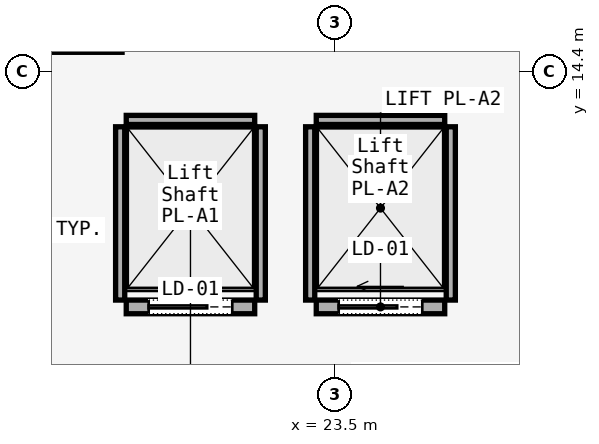
"""IFC4 building model, lengths in metres.
Left out: names, types, materials, properties, quantities, classifications, styles, units other than length and angle.
Written with IfcOpenShell. Run it as: python <this file> out.ifc"""

import sys

from ifc_helpers import new_model, si_unit, direction, frame, frame_2d, origin, place, context, subcontext, project, spatial, rectangle, extrude, element, fill, save


model = new_model("IFC4")
c1 = context("Model", 3, precision=1e-05, world=origin(), true_north=direction((0.0, 1.0)))
c2 = subcontext(c1, "Body", "Model", "MODEL_VIEW")
j1 = project(units=[si_unit("LENGTHUNIT", "METRE"), si_unit("PLANEANGLEUNIT", "RADIAN")], contexts=[c1])
p1 = place(None, origin())
s1 = spatial("IfcSite", under=j1, at=p1, CompositionType="ELEMENT")
p2 = place(p1, origin())
s2 = spatial("IfcBuilding", under=s1, at=p2, CompositionType="ELEMENT")
p3 = place(p2, frame((0.0, 0.0, 6.0)))
s3 = spatial("IfcBuildingStorey", under=s2, at=p3, CompositionType="ELEMENT", Elevation=6.0)
p4 = place(p3, frame((20.755, 11.3, 0.0), z_axis=(0.0, 0.0, 1.0), x_axis=(1.0, 0.0, 0.0)))
e1 = element("IfcWall", 1, at=p4, inside=s3, PredefinedType="SOLIDWALL", context=c2, shape_type="SweptSolid", body=[
    extrude(rectangle(XDim=1.69, YDim=0.18, at=frame_2d((0.845, 0.0))), origin(), (0.0, 0.0, 1.0), 4.819),
])
p5 = place(p4, frame((0.295, 0.0, 0.0)))
e2 = element("IfcOpeningElement", 2, at=p5, cuts=e1, PredefinedType="OPENING", context=c2, shape_type="SweptSolid", body=[
    extrude(rectangle(XDim=1.1, YDim=2.2, at=frame_2d((0.55, 1.1))), frame((0.0, 0.09, 0.0), z_axis=(0.0, -1.0, 0.0), x_axis=(1.0, 0.0, 0.0)), (0.0, 0.0, 1.0), 0.18),
])
p6 = place(p3, frame((20.755, 13.76, 0.0), z_axis=(0.0, 0.0, 1.0), x_axis=(1.0, 0.0, 0.0)))
e3 = element("IfcWall", 3, at=p6, inside=s3, PredefinedType="SOLIDWALL", context=c2, shape_type="SweptSolid", body=[
    extrude(rectangle(XDim=1.69, YDim=0.12, at=frame_2d((0.845, 0.0))), origin(), (0.0, 0.0, 1.0), 4.819),
])
for number, where, z_axis, x_axis in (
    (4, (20.675, 11.39, 0.0), (0.0, 0.0, 1.0), (0.0, 1.0, 0.0)),
    (5, (22.525, 11.39, 0.0), (0.0, 0.0, 1.0), (0.0, 1.0, 0.0)),
):
    element("IfcWall", number, at=place(p3, frame(where, z_axis=z_axis, x_axis=x_axis)), inside=s3, PredefinedType="SOLIDWALL", context=c2, shape_type="SweptSolid", body=[
        extrude(rectangle(XDim=2.28, YDim=0.12, at=frame_2d((1.14, 0.0))), origin(), (0.0, 0.0, 1.0), 4.819),
    ])
p7 = place(p3, frame((23.255, 11.3, 0.0), z_axis=(0.0, 0.0, 1.0), x_axis=(1.0, 0.0, 0.0)))
e6 = element("IfcWall", 6, at=p7, inside=s3, PredefinedType="SOLIDWALL", context=c2, shape_type="SweptSolid", body=[
    extrude(rectangle(XDim=1.69, YDim=0.18, at=frame_2d((0.845, 0.0))), origin(), (0.0, 0.0, 1.0), 4.819),
])
p8 = place(p7, frame((0.295, 0.0, 0.0)))
e7 = element("IfcOpeningElement", 7, at=p8, cuts=e6, PredefinedType="OPENING", context=c2, shape_type="SweptSolid", body=[
    extrude(rectangle(XDim=1.1, YDim=2.2, at=frame_2d((0.55, 1.1))), frame((0.0, 0.09, 0.0), z_axis=(0.0, -1.0, 0.0), x_axis=(1.0, 0.0, 0.0)), (0.0, 0.0, 1.0), 0.18),
])
p9 = place(p3, frame((23.255, 13.76, 0.0), z_axis=(0.0, 0.0, 1.0), x_axis=(1.0, 0.0, 0.0)))
e8 = element("IfcWall", 8, at=p9, inside=s3, PredefinedType="SOLIDWALL", context=c2, shape_type="SweptSolid", body=[
    extrude(rectangle(XDim=1.69, YDim=0.12, at=frame_2d((0.845, 0.0))), origin(), (0.0, 0.0, 1.0), 4.819),
])
for number, where, z_axis, x_axis in (
    (9, (23.175, 11.39, 0.0), (0.0, 0.0, 1.0), (0.0, 1.0, 0.0)),
    (10, (25.025, 11.39, 0.0), (0.0, 0.0, 1.0), (0.0, 1.0, 0.0)),
):
    element("IfcWall", number, at=place(p3, frame(where, z_axis=z_axis, x_axis=x_axis)), inside=s3, PredefinedType="SOLIDWALL", context=c2, shape_type="SweptSolid", body=[
        extrude(rectangle(XDim=2.28, YDim=0.12, at=frame_2d((1.14, 0.0))), origin(), (0.0, 0.0, 1.0), 4.819),
    ])
p10 = place(p5, origin())
e11 = element("IfcDoor", 11, at=p10, inside=s3, OperationType="SLIDING_TO_LEFT", PredefinedType="DOOR", context=c2, shape_type="SweptSolid", body=[
    extrude(rectangle(XDim=1.1, YDim=2.2, at=frame_2d((0.55, 1.1))), frame((0.0, 0.025, 0.0), z_axis=(0.0, -1.0, 0.0), x_axis=(1.0, 0.0, 0.0)), (0.0, 0.0, 1.0), 0.05),
])
fill(e2, e11)
p11 = place(p8, origin())
e12 = element("IfcDoor", 12, at=p11, inside=s3, OperationType="SLIDING_TO_LEFT", PredefinedType="DOOR", context=c2, shape_type="SweptSolid", body=[
    extrude(rectangle(XDim=1.1, YDim=2.2, at=frame_2d((0.55, 1.1))), frame((0.0, 0.025, 0.0), z_axis=(0.0, -1.0, 0.0), x_axis=(1.0, 0.0, 0.0)), (0.0, 0.0, 1.0), 0.05),
])
fill(e7, e12)
save(model, sys.argv[1])
